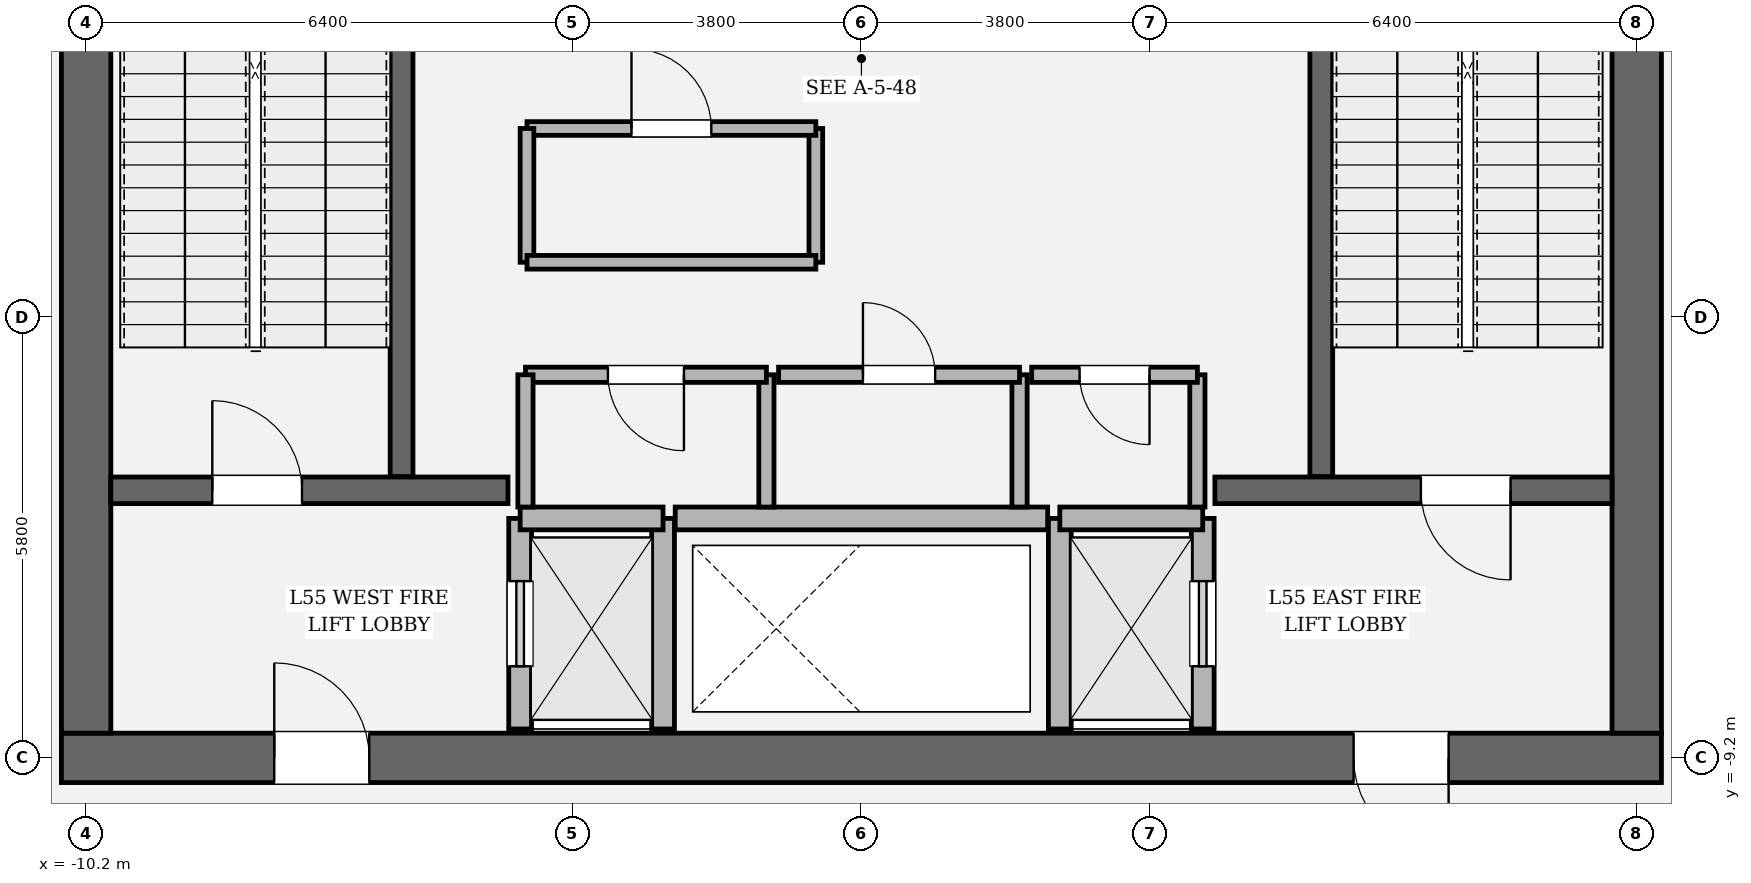
"""IFC4 building model, lengths in metres.
Left out: names, types, materials, properties, quantities, classifications, styles, units other than length and angle.
Written with IfcOpenShell. Run it as: python <this file> out.ifc"""

import sys

from ifc_helpers import new_model, si_unit, direction, frame, frame_2d, origin, place, context, subcontext, project, spatial, rectangle, extrude, element, fill, save


model = new_model("IFC4")
c1 = context("Model", 3, precision=1e-05, world=origin(), true_north=direction((0.0, 1.0)))
c2 = subcontext(c1, "Body", "Model", "MODEL_VIEW")
j1 = project(units=[si_unit("LENGTHUNIT", "METRE"), si_unit("PLANEANGLEUNIT", "RADIAN")], contexts=[c1])
p1 = place(None, origin())
s1 = spatial("IfcSite", under=j1, at=p1, CompositionType="ELEMENT")
p2 = place(p1, origin())
s2 = spatial("IfcBuilding", under=s1, at=p2, CompositionType="ELEMENT")
p3 = place(p2, frame((0.0, 0.0, 232.95)))
s3 = spatial("IfcBuildingStorey", under=s2, at=p3, CompositionType="ELEMENT", Elevation=232.95)
p4 = place(p3, frame((10.525, -9.2, 0.0), z_axis=(0.0, 0.0, 1.0), x_axis=(-1.0, 0.0, 0.0)))
e1 = element("IfcWall", 1, at=p4, inside=s3, PredefinedType="SHEAR", context=c2, shape_type="SweptSolid", body=[
    extrude(rectangle(XDim=21.05, YDim=0.65, at=frame_2d((10.525, 0.0))), origin(), (0.0, 0.0, 1.0), 4.05),
])
p5 = place(p4, frame((2.8, 0.0, 0.0)))
e2 = element("IfcOpeningElement", 2, at=p5, cuts=e1, PredefinedType="OPENING", context=c2, shape_type="SweptSolid", body=[
    extrude(rectangle(XDim=1.25, YDim=2.25, at=frame_2d((0.625, 1.125))), frame((0.0, 0.335, 0.0), z_axis=(0.0, -1.0, 0.0), x_axis=(1.0, 0.0, 0.0)), (0.0, 0.0, 1.0), 0.67),
])
p6 = place(p4, frame((17.0, 0.0, 0.0)))
e3 = element("IfcOpeningElement", 3, at=p6, cuts=e1, PredefinedType="OPENING", context=c2, shape_type="SweptSolid", body=[
    extrude(rectangle(XDim=1.25, YDim=2.25, at=frame_2d((0.625, 1.125))), frame((0.0, 0.335, 0.0), z_axis=(0.0, -1.0, 0.0), x_axis=(1.0, 0.0, 0.0)), (0.0, 0.0, 1.0), 0.67),
])
p7 = place(p3, frame((-10.2, -8.875, 0.0), z_axis=(0.0, 0.0, 1.0), x_axis=(0.0, 1.0, 0.0)))
e4 = element("IfcWall", 4, at=p7, inside=s3, PredefinedType="SHEAR", context=c2, shape_type="SweptSolid", body=[
    extrude(rectangle(XDim=17.75, YDim=0.65, at=frame_2d((8.875, 0.0))), origin(), (0.0, 0.0, 1.0), 4.05),
])
p8 = place(p7, frame((12.665, 0.0, 0.0)))
e5 = element("IfcOpeningElement", 5, at=p8, cuts=e4, PredefinedType="OPENING", context=c2, shape_type="SweptSolid", body=[
    extrude(rectangle(XDim=1.18, YDim=2.2, at=frame_2d((0.59, 1.1))), frame((0.0, 0.335, 0.0), z_axis=(0.0, -1.0, 0.0), x_axis=(1.0, 0.0, 0.0)), (0.0, 0.0, 1.0), 0.67),
])
p9 = place(p3, frame((10.2, 8.875, 0.0), z_axis=(0.0, 0.0, 1.0), x_axis=(0.0, -1.0, 0.0)))
e6 = element("IfcWall", 6, at=p9, inside=s3, PredefinedType="SHEAR", context=c2, shape_type="SweptSolid", body=[
    extrude(rectangle(XDim=17.75, YDim=0.65, at=frame_2d((8.875, 0.0))), origin(), (0.0, 0.0, 1.0), 4.05),
])
p10 = place(p9, frame((3.905, 0.0, 0.0)))
e7 = element("IfcOpeningElement", 7, at=p10, cuts=e6, PredefinedType="OPENING", context=c2, shape_type="SweptSolid", body=[
    extrude(rectangle(XDim=1.18, YDim=2.2, at=frame_2d((0.59, 1.1))), frame((0.0, 0.335, 0.0), z_axis=(0.0, -1.0, 0.0), x_axis=(1.0, 0.0, 0.0)), (0.0, 0.0, 1.0), 0.67),
])
for number, where, z_axis, x_axis in (
    (8, (-6.05, -5.5, 0.0), (0.0, 0.0, 1.0), (0.0, 1.0, 0.0)),
    (9, (6.05, 3.45, 0.0), (0.0, 0.0, 1.0), (0.0, -1.0, 0.0)),
):
    element("IfcWall", number, at=place(p3, frame(where, z_axis=z_axis, x_axis=x_axis)), inside=s3, PredefinedType="SOLIDWALL", context=c2, shape_type="SweptSolid", body=[
        extrude(rectangle(XDim=8.95, YDim=0.3, at=frame_2d((4.475, 0.0))), origin(), (0.0, 0.0, 1.0), 4.05),
    ])
p11 = place(p3, frame((-9.875, -5.68, 0.0), z_axis=(0.0, 0.0, 1.0), x_axis=(1.0, 0.0, 0.0)))
e10 = element("IfcWall", 10, at=p11, inside=s3, PredefinedType="SOLIDWALL", context=c2, shape_type="SweptSolid", body=[
    extrude(rectangle(XDim=5.225, YDim=0.35, at=frame_2d((2.613, 0.0))), origin(), (0.0, 0.0, 1.0), 4.05),
])
p12 = place(p11, frame((1.335, 0.0, 0.0)))
e11 = element("IfcOpeningElement", 11, at=p12, cuts=e10, PredefinedType="OPENING", context=c2, shape_type="SweptSolid", body=[
    extrude(rectangle(XDim=1.18, YDim=2.2, at=frame_2d((0.59, 1.1))), frame((0.0, 0.185, 0.0), z_axis=(0.0, -1.0, 0.0), x_axis=(1.0, 0.0, 0.0)), (0.0, 0.0, 1.0), 0.37),
])
p13 = place(p3, frame((4.65, -5.68, 0.0), z_axis=(0.0, 0.0, 1.0), x_axis=(1.0, 0.0, 0.0)))
e12 = element("IfcWall", 12, at=p13, inside=s3, PredefinedType="SOLIDWALL", context=c2, shape_type="SweptSolid", body=[
    extrude(rectangle(XDim=5.225, YDim=0.35, at=frame_2d((2.613, 0.0))), origin(), (0.0, 0.0, 1.0), 4.05),
])
p14 = place(p13, frame((2.71, 0.0, 0.0)))
e13 = element("IfcOpeningElement", 13, at=p14, cuts=e12, PredefinedType="OPENING", context=c2, shape_type="SweptSolid", body=[
    extrude(rectangle(XDim=1.18, YDim=2.2, at=frame_2d((0.59, 1.1))), frame((0.0, 0.185, 0.0), z_axis=(0.0, -1.0, 0.0), x_axis=(1.0, 0.0, 0.0)), (0.0, 0.0, 1.0), 0.37),
])
p15 = place(p3, frame((-4.49, -8.82, 0.0), z_axis=(0.0, 0.0, 1.0), x_axis=(0.0, 1.0, 0.0)))
e14 = element("IfcWall", 14, at=p15, inside=s3, PredefinedType="SOLIDWALL", context=c2, shape_type="SweptSolid", body=[
    extrude(rectangle(XDim=2.77, YDim=0.3, at=frame_2d((1.385, 0.0))), origin(), (0.0, 0.0, 1.0), 3.73),
])
p16 = place(p15, frame((0.825, 0.0, 0.0)))
e15 = element("IfcOpeningElement", 15, at=p16, cuts=e14, PredefinedType="OPENING", context=c2, shape_type="SweptSolid", body=[
    extrude(rectangle(XDim=1.12, YDim=2.25, at=frame_2d((0.56, 1.125))), frame((0.0, 0.16, 0.0), z_axis=(0.0, -1.0, 0.0), x_axis=(1.0, 0.0, 0.0)), (0.0, 0.0, 1.0), 0.32),
])
p17 = place(p3, frame((-2.61, -8.82, 0.0), z_axis=(0.0, 0.0, 1.0), x_axis=(0.0, 1.0, 0.0)))
e16 = element("IfcWall", 16, at=p17, inside=s3, PredefinedType="SOLIDWALL", context=c2, shape_type="SweptSolid", body=[
    extrude(rectangle(XDim=2.77, YDim=0.3, at=frame_2d((1.385, 0.0))), origin(), (0.0, 0.0, 1.0), 3.73),
])
p18 = place(p3, frame((-4.49, -6.05, 0.0), z_axis=(0.0, 0.0, 1.0), x_axis=(1.0, 0.0, 0.0)))
e17 = element("IfcWall", 17, at=p18, inside=s3, PredefinedType="SOLIDWALL", context=c2, shape_type="SweptSolid", body=[
    extrude(rectangle(XDim=1.88, YDim=0.3, at=frame_2d((0.94, 0.0))), origin(), (0.0, 0.0, 1.0), 3.73),
])
p19 = place(p3, frame((4.49, -8.82, 0.0), z_axis=(0.0, 0.0, 1.0), x_axis=(0.0, 1.0, 0.0)))
e18 = element("IfcWall", 18, at=p19, inside=s3, PredefinedType="SOLIDWALL", context=c2, shape_type="SweptSolid", body=[
    extrude(rectangle(XDim=2.77, YDim=0.3, at=frame_2d((1.385, 0.0))), origin(), (0.0, 0.0, 1.0), 3.73),
])
p20 = place(p19, frame((0.825, 0.0, 0.0)))
e19 = element("IfcOpeningElement", 19, at=p20, cuts=e18, PredefinedType="OPENING", context=c2, shape_type="SweptSolid", body=[
    extrude(rectangle(XDim=1.12, YDim=2.25, at=frame_2d((0.56, 1.125))), frame((0.0, 0.16, 0.0), z_axis=(0.0, -1.0, 0.0), x_axis=(1.0, 0.0, 0.0)), (0.0, 0.0, 1.0), 0.32),
])
p21 = place(p3, frame((2.61, -8.82, 0.0), z_axis=(0.0, 0.0, 1.0), x_axis=(0.0, 1.0, 0.0)))
e20 = element("IfcWall", 20, at=p21, inside=s3, PredefinedType="SOLIDWALL", context=c2, shape_type="SweptSolid", body=[
    extrude(rectangle(XDim=2.77, YDim=0.3, at=frame_2d((1.385, 0.0))), origin(), (0.0, 0.0, 1.0), 3.73),
])
p22 = place(p3, frame((2.61, -6.05, 0.0), z_axis=(0.0, 0.0, 1.0), x_axis=(1.0, 0.0, 0.0)))
e21 = element("IfcWall", 21, at=p22, inside=s3, PredefinedType="SOLIDWALL", context=c2, shape_type="SweptSolid", body=[
    extrude(rectangle(XDim=1.88, YDim=0.3, at=frame_2d((0.94, 0.0))), origin(), (0.0, 0.0, 1.0), 3.73),
])
p23 = place(p3, frame((-2.45, -6.05, 0.0), z_axis=(0.0, 0.0, 1.0), x_axis=(1.0, 0.0, 0.0)))
e22 = element("IfcWall", 22, at=p23, inside=s3, PredefinedType="SOLIDWALL", context=c2, shape_type="SweptSolid", body=[
    extrude(rectangle(XDim=4.9, YDim=0.3, at=frame_2d((2.45, 0.0))), origin(), (0.0, 0.0, 1.0), 3.73),
])
p24 = place(p3, frame((-1.25, -5.9, 0.0), z_axis=(0.0, 0.0, 1.0), x_axis=(0.0, 1.0, 0.0)))
e23 = element("IfcWall", 23, at=p24, inside=s3, PredefinedType="SOLIDWALL", context=c2, shape_type="SweptSolid", body=[
    extrude(rectangle(XDim=1.74, YDim=0.2, at=frame_2d((0.87, 0.0))), origin(), (0.0, 0.0, 1.0), 3.73),
])
p25 = place(p3, frame((-1.25, -4.16, 0.0), z_axis=(0.0, 0.0, 1.0), x_axis=(-1.0, 0.0, 0.0)))
e24 = element("IfcWall", 24, at=p25, inside=s3, PredefinedType="SOLIDWALL", context=c2, shape_type="SweptSolid", body=[
    extrude(rectangle(XDim=3.17, YDim=0.2, at=frame_2d((1.585, 0.0))), origin(), (0.0, 0.0, 1.0), 3.73),
])
p26 = place(p25, frame((1.085, 0.0, 0.0)))
e25 = element("IfcOpeningElement", 25, at=p26, cuts=e24, PredefinedType="OPENING", context=c2, shape_type="SweptSolid", body=[
    extrude(rectangle(XDim=1.0, YDim=2.15, at=frame_2d((0.5, 1.075))), frame((0.0, 0.11, 0.0), z_axis=(0.0, -1.0, 0.0), x_axis=(1.0, 0.0, 0.0)), (0.0, 0.0, 1.0), 0.22),
])
for number, where, z_axis, x_axis in (
    (26, (-4.42, -4.16, 0.0), (0.0, 0.0, 1.0), (0.0, -1.0, 0.0)),
    (27, (2.08, -5.9, 0.0), (0.0, 0.0, 1.0), (0.0, 1.0, 0.0)),
):
    element("IfcWall", number, at=place(p3, frame(where, z_axis=z_axis, x_axis=x_axis)), inside=s3, PredefinedType="SOLIDWALL", context=c2, shape_type="SweptSolid", body=[
        extrude(rectangle(XDim=1.74, YDim=0.2, at=frame_2d((0.87, 0.0))), origin(), (0.0, 0.0, 1.0), 3.73),
    ])
p27 = place(p3, frame((2.08, -4.16, 0.0), z_axis=(0.0, 0.0, 1.0), x_axis=(-1.0, 0.0, 0.0)))
e28 = element("IfcWall", 28, at=p27, inside=s3, PredefinedType="SOLIDWALL", context=c2, shape_type="SweptSolid", body=[
    extrude(rectangle(XDim=3.17, YDim=0.2, at=frame_2d((1.585, 0.0))), origin(), (0.0, 0.0, 1.0), 3.73),
])
p28 = place(p27, frame((1.11, 0.0, 0.0)))
e29 = element("IfcOpeningElement", 29, at=p28, cuts=e28, PredefinedType="OPENING", context=c2, shape_type="SweptSolid", body=[
    extrude(rectangle(XDim=0.95, YDim=2.15, at=frame_2d((0.475, 1.075))), frame((0.0, 0.11, 0.0), z_axis=(0.0, -1.0, 0.0), x_axis=(1.0, 0.0, 0.0)), (0.0, 0.0, 1.0), 0.22),
])
p29 = place(p3, frame((4.42, -5.9, 0.0), z_axis=(0.0, 0.0, 1.0), x_axis=(0.0, 1.0, 0.0)))
e30 = element("IfcWall", 30, at=p29, inside=s3, PredefinedType="SOLIDWALL", context=c2, shape_type="SweptSolid", body=[
    extrude(rectangle(XDim=1.74, YDim=0.2, at=frame_2d((0.87, 0.0))), origin(), (0.0, 0.0, 1.0), 3.73),
])
p30 = place(p3, frame((4.42, -4.16, 0.0), z_axis=(0.0, 0.0, 1.0), x_axis=(-1.0, 0.0, 0.0)))
e31 = element("IfcWall", 31, at=p30, inside=s3, PredefinedType="SOLIDWALL", context=c2, shape_type="SweptSolid", body=[
    extrude(rectangle(XDim=2.18, YDim=0.2, at=frame_2d((1.09, 0.0))), origin(), (0.0, 0.0, 1.0), 3.73),
])
p31 = place(p30, frame((0.63, 0.0, 0.0)))
e32 = element("IfcOpeningElement", 32, at=p31, cuts=e31, PredefinedType="OPENING", context=c2, shape_type="SweptSolid", body=[
    extrude(rectangle(XDim=0.92, YDim=2.1, at=frame_2d((0.46, 1.05))), frame((0.0, 0.11, 0.0), z_axis=(0.0, -1.0, 0.0), x_axis=(1.0, 0.0, 0.0)), (0.0, 0.0, 1.0), 0.22),
])
p32 = place(p3, frame((-0.6, -2.68, 0.0), z_axis=(0.0, 0.0, 1.0), x_axis=(0.0, 1.0, 0.0)))
e33 = element("IfcWall", 33, at=p32, inside=s3, PredefinedType="PARTITIONING", context=c2, shape_type="SweptSolid", body=[
    extrude(rectangle(XDim=1.76, YDim=0.18, at=frame_2d((0.88, 0.0))), origin(), (0.0, 0.0, 1.0), 3.73),
])
p33 = place(p3, frame((-0.6, -0.92, 0.0), z_axis=(0.0, 0.0, 1.0), x_axis=(-1.0, 0.0, 0.0)))
e34 = element("IfcWall", 34, at=p33, inside=s3, PredefinedType="PARTITIONING", context=c2, shape_type="SweptSolid", body=[
    extrude(rectangle(XDim=3.8, YDim=0.18, at=frame_2d((1.9, 0.0))), origin(), (0.0, 0.0, 1.0), 3.73),
])
p34 = place(p33, frame((1.375, 0.0, 0.0)))
e35 = element("IfcOpeningElement", 35, at=p34, cuts=e34, PredefinedType="OPENING", context=c2, shape_type="SweptSolid", body=[
    extrude(rectangle(XDim=1.05, YDim=2.2, at=frame_2d((0.525, 1.1))), frame((0.0, 0.1, 0.0), z_axis=(0.0, -1.0, 0.0), x_axis=(1.0, 0.0, 0.0)), (0.0, 0.0, 1.0), 0.2),
])
p35 = place(p3, frame((-4.4, -0.92, 0.0), z_axis=(0.0, 0.0, 1.0), x_axis=(0.0, -1.0, 0.0)))
e36 = element("IfcWall", 36, at=p35, inside=s3, PredefinedType="PARTITIONING", context=c2, shape_type="SweptSolid", body=[
    extrude(rectangle(XDim=1.76, YDim=0.18, at=frame_2d((0.88, 0.0))), origin(), (0.0, 0.0, 1.0), 3.73),
])
p36 = place(p3, frame((-4.4, -2.68, 0.0), z_axis=(0.0, 0.0, 1.0), x_axis=(1.0, 0.0, 0.0)))
e37 = element("IfcWall", 37, at=p36, inside=s3, PredefinedType="PARTITIONING", context=c2, shape_type="SweptSolid", body=[
    extrude(rectangle(XDim=3.8, YDim=0.18, at=frame_2d((1.9, 0.0))), origin(), (0.0, 0.0, 1.0), 3.73),
])
p37 = place(p12, origin())
e38 = element("IfcDoor", 38, at=p37, inside=s3, OperationType="SINGLE_SWING_LEFT", PredefinedType="DOOR", context=c2, shape_type="SweptSolid", body=[
    extrude(rectangle(XDim=1.18, YDim=2.2, at=frame_2d((0.59, 1.1))), frame((0.0, 0.025, 0.0), z_axis=(0.0, -1.0, 0.0), x_axis=(1.0, 0.0, 0.0)), (0.0, 0.0, 1.0), 0.05),
])
fill(e11, e38)
p38 = place(p14, origin())
e39 = element("IfcDoor", 39, at=p38, inside=s3, OperationType="SINGLE_SWING_RIGHT", PredefinedType="DOOR", context=c2, shape_type="SweptSolid", body=[
    extrude(rectangle(XDim=1.18, YDim=2.2, at=frame_2d((0.59, 1.1))), frame((0.0, 0.025, 0.0), z_axis=(0.0, -1.0, 0.0), x_axis=(1.0, 0.0, 0.0)), (0.0, 0.0, 1.0), 0.05),
])
fill(e13, e39)
p39 = place(p5, origin())
e40 = element("IfcDoor", 40, at=p39, inside=s3, OperationType="SINGLE_SWING_LEFT", PredefinedType="DOOR", context=c2, shape_type="SweptSolid", body=[
    extrude(rectangle(XDim=1.25, YDim=2.25, at=frame_2d((0.625, 1.125))), frame((0.0, 0.025, 0.0), z_axis=(0.0, -1.0, 0.0), x_axis=(1.0, 0.0, 0.0)), (0.0, 0.0, 1.0), 0.05),
])
fill(e2, e40)
p40 = place(p6, origin())
e41 = element("IfcDoor", 41, at=p40, inside=s3, OperationType="SINGLE_SWING_RIGHT", PredefinedType="DOOR", context=c2, shape_type="SweptSolid", body=[
    extrude(rectangle(XDim=1.25, YDim=2.25, at=frame_2d((0.625, 1.125))), frame((0.0, 0.025, 0.0), z_axis=(0.0, -1.0, 0.0), x_axis=(1.0, 0.0, 0.0)), (0.0, 0.0, 1.0), 0.05),
])
fill(e3, e41)
p41 = place(p16, origin())
e42 = element("IfcDoor", 42, at=p41, inside=s3, OperationType="SLIDING_TO_LEFT", PredefinedType="DOOR", context=c2, shape_type="SweptSolid", body=[
    extrude(rectangle(XDim=1.12, YDim=2.25, at=frame_2d((0.56, 1.125))), frame((0.0, 0.025, 0.0), z_axis=(0.0, -1.0, 0.0), x_axis=(1.0, 0.0, 0.0)), (0.0, 0.0, 1.0), 0.05),
])
fill(e15, e42)
p42 = place(p20, origin())
e43 = element("IfcDoor", 43, at=p42, inside=s3, OperationType="SLIDING_TO_RIGHT", PredefinedType="DOOR", context=c2, shape_type="SweptSolid", body=[
    extrude(rectangle(XDim=1.12, YDim=2.25, at=frame_2d((0.56, 1.125))), frame((0.0, 0.025, 0.0), z_axis=(0.0, -1.0, 0.0), x_axis=(1.0, 0.0, 0.0)), (0.0, 0.0, 1.0), 0.05),
])
fill(e19, e43)
p43 = place(p26, origin())
e44 = element("IfcDoor", 44, at=p43, inside=s3, OperationType="SINGLE_SWING_LEFT", PredefinedType="DOOR", context=c2, shape_type="SweptSolid", body=[
    extrude(rectangle(XDim=1.0, YDim=2.15, at=frame_2d((0.5, 1.075))), frame((0.0, 0.025, 0.0), z_axis=(0.0, -1.0, 0.0), x_axis=(1.0, 0.0, 0.0)), (0.0, 0.0, 1.0), 0.05),
])
fill(e25, e44)
p44 = place(p28, origin())
e45 = element("IfcDoor", 45, at=p44, inside=s3, OperationType="SINGLE_SWING_RIGHT", PredefinedType="DOOR", context=c2, shape_type="SweptSolid", body=[
    extrude(rectangle(XDim=0.95, YDim=2.15, at=frame_2d((0.475, 1.075))), frame((0.0, 0.025, 0.0), z_axis=(0.0, -1.0, 0.0), x_axis=(1.0, 0.0, 0.0)), (0.0, 0.0, 1.0), 0.05),
])
fill(e29, e45)
p45 = place(p31, origin())
e46 = element("IfcDoor", 46, at=p45, inside=s3, OperationType="SINGLE_SWING_LEFT", PredefinedType="DOOR", context=c2, shape_type="SweptSolid", body=[
    extrude(rectangle(XDim=0.92, YDim=2.1, at=frame_2d((0.46, 1.05))), frame((0.0, 0.025, 0.0), z_axis=(0.0, -1.0, 0.0), x_axis=(1.0, 0.0, 0.0)), (0.0, 0.0, 1.0), 0.05),
])
fill(e32, e46)
p46 = place(p34, origin())
e47 = element("IfcDoor", 47, at=p46, inside=s3, OperationType="SINGLE_SWING_RIGHT", PredefinedType="DOOR", context=c2, shape_type="SweptSolid", body=[
    extrude(rectangle(XDim=1.05, YDim=2.2, at=frame_2d((0.525, 1.1))), frame((0.0, 0.025, 0.0), z_axis=(0.0, -1.0, 0.0), x_axis=(1.0, 0.0, 0.0)), (0.0, 0.0, 1.0), 0.05),
])
fill(e35, e47)
save(model, sys.argv[1])
